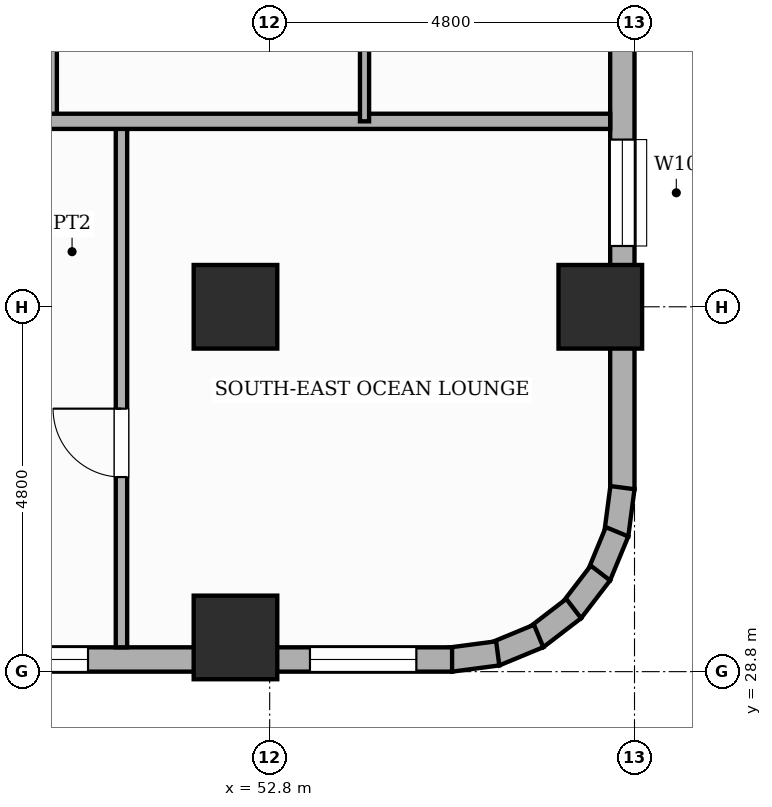
"""IFC4 building model, lengths in metres.
Left out: names, types, materials, properties, quantities, classifications, styles, units other than length and angle.
Written with IfcOpenShell. Run it as: python <this file> out.ifc"""

import sys

from ifc_helpers import new_model, si_unit, direction, frame, frame_2d, origin, origin_2d, place, context, subcontext, project, spatial, rectangle, extrude, element, fill, save


model = new_model("IFC4")
c1 = context("Model", 3, precision=1e-05, world=origin(), true_north=direction((0.0, 1.0)))
c2 = subcontext(c1, "Body", "Model", "MODEL_VIEW")
j1 = project(units=[si_unit("LENGTHUNIT", "METRE"), si_unit("PLANEANGLEUNIT", "RADIAN")], contexts=[c1])
p1 = place(None, origin())
s1 = spatial("IfcSite", under=j1, at=p1, CompositionType="ELEMENT")
p2 = place(p1, origin())
s2 = spatial("IfcBuilding", under=s1, at=p2, CompositionType="ELEMENT")
p3 = place(p2, frame((0.0, 0.0, 68.2)))
s3 = spatial("IfcBuildingStorey", under=s2, at=p3, CompositionType="ELEMENT", Elevation=68.2)
for number, where, z_axis, x_axis in (
    (1, (52.35, 29.25, 0.0), (0.0, 0.0, 1.0), (1.0, 0.0, 0.0)),
    (2, (52.35, 33.6, 0.0), (0.0, 0.0, 1.0), (1.0, 0.0, 0.0)),
    (3, (57.15, 33.6, 0.0), (0.0, 0.0, 1.0), (1.0, 0.0, 0.0)),
):
    element("IfcColumn", number, at=place(p3, frame(where, z_axis=z_axis, x_axis=x_axis)), inside=s3, PredefinedType="COLUMN", context=c2, shape_type="SweptSolid", body=[
        extrude(rectangle(XDim=1.1, YDim=1.1, at=origin_2d()), origin(), (0.0, 0.0, 1.0), 3.6),
    ])
p4 = place(p3, frame((57.44, 45.6, 0.0), z_axis=(0.0, 0.0, 1.0), x_axis=(0.0, -1.0, 0.0)))
e4 = element("IfcWall", 4, at=p4, inside=s3, PredefinedType="STANDARD", context=c2, shape_type="SweptSolid", body=[
    extrude(rectangle(XDim=14.4, YDim=0.32, at=frame_2d((7.2, 0.0))), origin(), (0.0, 0.0, 1.0), 2.53),
])
p5 = place(p4, frame((3.75, 0.0, 0.0)))
e5 = element("IfcOpeningElement", 5, at=p5, cuts=e4, PredefinedType="OPENING", context=c2, shape_type="SweptSolid", body=[
    extrude(rectangle(XDim=1.1, YDim=2.15, at=frame_2d((0.55, 1.075))), frame((0.0, 0.17, 0.0), z_axis=(0.0, -1.0, 0.0), x_axis=(1.0, 0.0, 0.0)), (0.0, 0.0, 1.0), 0.34),
])
p6 = place(p4, frame((5.428, 0.0, 0.45)))
e6 = element("IfcOpeningElement", 6, at=p6, cuts=e4, PredefinedType="OPENING", context=c2, shape_type="SweptSolid", body=[
    extrude(rectangle(XDim=0.95, YDim=1.8, at=frame_2d((0.475, 0.9))), frame((0.0, 0.17, 0.0), z_axis=(0.0, -1.0, 0.0), x_axis=(1.0, 0.0, 0.0)), (0.0, 0.0, 1.0), 0.34),
])
p7 = place(p4, frame((9.8, 0.0, 0.65)))
e7 = element("IfcOpeningElement", 7, at=p7, cuts=e4, PredefinedType="OPENING", context=c2, shape_type="SweptSolid", body=[
    extrude(rectangle(XDim=1.4, YDim=1.1, at=frame_2d((0.7, 0.55))), frame((0.0, 0.17, 0.0), z_axis=(0.0, -1.0, 0.0), x_axis=(1.0, 0.0, 0.0)), (0.0, 0.0, 1.0), 0.34),
])
p8 = place(p4, frame((0.771, 0.0, 0.45)))
e8 = element("IfcOpeningElement", 8, at=p8, cuts=e4, PredefinedType="OPENING", context=c2, shape_type="SweptSolid", body=[
    extrude(rectangle(XDim=0.75, YDim=1.8, at=frame_2d((0.375, 0.9))), frame((0.0, 0.17, 0.0), z_axis=(0.0, -1.0, 0.0), x_axis=(1.0, 0.0, 0.0)), (0.0, 0.0, 1.0), 0.34),
])
p9 = place(p3, frame((57.441, 31.221, 0.0), z_axis=(0.0, 0.0, 1.0), x_axis=(-0.130504898859, -0.991447664465, 0.0)))
e9 = element("IfcWall", 9, at=p9, inside=s3, PredefinedType="STANDARD", context=c2, shape_type="SweptSolid", body=[
    extrude(rectangle(XDim=0.627, YDim=0.32, at=frame_2d((0.313, 0.0))), origin(), (0.0, 0.0, 1.0), 3.35),
])
p10 = place(p3, frame((57.37, 30.64, 0.0), z_axis=(0.0, 0.0, 1.0), x_axis=(-0.382787856107, -0.923836271867, 0.0)))
e10 = element("IfcWall", 10, at=p10, inside=s3, PredefinedType="STANDARD", context=c2, shape_type="SweptSolid", body=[
    extrude(rectangle(XDim=0.626, YDim=0.32, at=frame_2d((0.313, 0.0))), origin(), (0.0, 0.0, 1.0), 3.35),
])
p11 = place(p3, frame((57.152, 30.097, 0.0), z_axis=(0.0, 0.0, 1.0), x_axis=(-0.608693302629, -0.793405610854, 0.0)))
e11 = element("IfcWall", 11, at=p11, inside=s3, PredefinedType="STANDARD", context=c2, shape_type="SweptSolid", body=[
    extrude(rectangle(XDim=0.626, YDim=0.32, at=frame_2d((0.313, 0.0))), origin(), (0.0, 0.0, 1.0), 3.35),
])
p12 = place(p3, frame((56.8, 29.63, 0.0), z_axis=(0.0, 0.0, 1.0), x_axis=(-0.793361818833, -0.608750379399, 0.0)))
e12 = element("IfcWall", 12, at=p12, inside=s3, PredefinedType="STANDARD", context=c2, shape_type="SweptSolid", body=[
    extrude(rectangle(XDim=0.627, YDim=0.32, at=frame_2d((0.313, 0.0))), origin(), (0.0, 0.0, 1.0), 3.35),
])
for number, where, z_axis, x_axis in (
    (13, (56.339, 29.269, 0.0), (0.0, 0.0, 1.0), (-0.924, -0.383, 0.0)),
    (14, (55.8, 29.04, 0.0), (0.0, 0.0, 1.0), (-0.991, -0.131, 0.0)),
):
    element("IfcWall", number, at=place(p3, frame(where, z_axis=z_axis, x_axis=x_axis)), inside=s3, PredefinedType="STANDARD", context=c2, shape_type="SweptSolid", body=[
        extrude(rectangle(XDim=0.626, YDim=0.32, at=frame_2d((0.313, 0.0))), origin(), (0.0, 0.0, 1.0), 3.35),
    ])
p13 = place(p3, frame((55.2, 28.96, 0.0), z_axis=(0.0, 0.0, 1.0), x_axis=(-1.0, 0.0, 0.0)))
e15 = element("IfcWall", 15, at=p13, inside=s3, PredefinedType="STANDARD", context=c2, shape_type="SweptSolid", body=[
    extrude(rectangle(XDim=28.8, YDim=0.32, at=frame_2d((14.4, 0.0))), origin(), (0.0, 0.0, 1.0), 2.53),
])
p14 = place(p13, frame((23.3, 0.0, 0.65)))
e16 = element("IfcOpeningElement", 16, at=p14, cuts=e15, PredefinedType="OPENING", context=c2, shape_type="SweptSolid", body=[
    extrude(rectangle(XDim=1.4, YDim=1.1, at=frame_2d((0.7, 0.55))), frame((0.0, 0.17, 0.0), z_axis=(0.0, -1.0, 0.0), x_axis=(1.0, 0.0, 0.0)), (0.0, 0.0, 1.0), 0.34),
])
p15 = place(p13, frame((13.0, 0.0, 0.65)))
e17 = element("IfcOpeningElement", 17, at=p15, cuts=e15, PredefinedType="OPENING", context=c2, shape_type="SweptSolid", body=[
    extrude(rectangle(XDim=1.4, YDim=1.1, at=frame_2d((0.7, 0.55))), frame((0.0, 0.17, 0.0), z_axis=(0.0, -1.0, 0.0), x_axis=(1.0, 0.0, 0.0)), (0.0, 0.0, 1.0), 0.34),
])
p16 = place(p13, frame((4.79, 0.0, 0.65)))
e18 = element("IfcOpeningElement", 18, at=p16, cuts=e15, PredefinedType="OPENING", context=c2, shape_type="SweptSolid", body=[
    extrude(rectangle(XDim=1.4, YDim=1.1, at=frame_2d((0.7, 0.55))), frame((0.0, 0.17, 0.0), z_axis=(0.0, -1.0, 0.0), x_axis=(1.0, 0.0, 0.0)), (0.0, 0.0, 1.0), 0.34),
])
p17 = place(p13, frame((0.47, 0.0, 0.65)))
e19 = element("IfcOpeningElement", 19, at=p17, cuts=e15, PredefinedType="OPENING", context=c2, shape_type="SweptSolid", body=[
    extrude(rectangle(XDim=1.4, YDim=1.1, at=frame_2d((0.7, 0.55))), frame((0.0, 0.17, 0.0), z_axis=(0.0, -1.0, 0.0), x_axis=(1.0, 0.0, 0.0)), (0.0, 0.0, 1.0), 0.34),
])
p18 = place(p13, frame((15.055, 0.0, 0.45)))
e20 = element("IfcOpeningElement", 20, at=p18, cuts=e15, PredefinedType="OPENING", context=c2, shape_type="SweptSolid", body=[
    extrude(rectangle(XDim=0.95, YDim=1.8, at=frame_2d((0.475, 0.9))), frame((0.0, 0.17, 0.0), z_axis=(0.0, -1.0, 0.0), x_axis=(1.0, 0.0, 0.0)), (0.0, 0.0, 1.0), 0.34),
])
p19 = place(p3, frame((49.9, 36.04, 0.0), z_axis=(0.0, 0.0, 1.0), x_axis=(0.0, 1.0, 0.0)))
e21 = element("IfcWall", 21, at=p19, inside=s3, PredefinedType="PARTITIONING", context=c2, shape_type="SweptSolid", body=[
    extrude(rectangle(XDim=11.64, YDim=0.2, at=frame_2d((5.82, 0.0))), origin(), (0.0, 0.0, 1.0), 3.35),
])
p20 = place(p19, frame((6.251, 0.0, 0.0)))
e22 = element("IfcOpeningElement", 22, at=p20, cuts=e21, PredefinedType="OPENING", context=c2, shape_type="SweptSolid", body=[
    extrude(rectangle(XDim=0.98, YDim=2.18, at=frame_2d((0.49, 1.09))), frame((0.0, 0.11, 0.0), z_axis=(0.0, -1.0, 0.0), x_axis=(1.0, 0.0, 0.0)), (0.0, 0.0, 1.0), 0.22),
])
p21 = place(p3, frame((50.85, 29.12, 0.0), z_axis=(0.0, 0.0, 1.0), x_axis=(0.0, 1.0, 0.0)))
e23 = element("IfcWall", 23, at=p21, inside=s3, PredefinedType="PARTITIONING", context=c2, shape_type="SweptSolid", body=[
    extrude(rectangle(XDim=6.92, YDim=0.15, at=frame_2d((3.46, 0.0))), origin(), (0.0, 0.0, 1.0), 3.35),
])
p22 = place(p21, frame((2.24, 0.0, 0.0)))
e24 = element("IfcOpeningElement", 24, at=p22, cuts=e23, PredefinedType="OPENING", context=c2, shape_type="SweptSolid", body=[
    extrude(rectangle(XDim=0.9, YDim=2.15, at=frame_2d((0.45, 1.075))), frame((0.0, 0.085, 0.0), z_axis=(0.0, -1.0, 0.0), x_axis=(1.0, 0.0, 0.0)), (0.0, 0.0, 1.0), 0.17),
])
p23 = place(p3, frame((49.9, 36.04, 0.0), z_axis=(0.0, 0.0, 1.0), x_axis=(1.0, 0.0, 0.0)))
e25 = element("IfcWall", 25, at=p23, inside=s3, PredefinedType="SOLIDWALL", context=c2, shape_type="SweptSolid", body=[
    extrude(rectangle(XDim=7.38, YDim=0.2, at=frame_2d((3.69, 0.0))), origin(), (0.0, 0.0, 1.0), 3.35),
])
p24 = place(p3, frame((54.048, 36.04, 0.0), z_axis=(0.0, 0.0, 1.0), x_axis=(0.0, 1.0, 0.0)))
e26 = element("IfcWall", 26, at=p24, inside=s3, PredefinedType="PARTITIONING", context=c2, shape_type="SweptSolid", body=[
    extrude(rectangle(XDim=4.384, YDim=0.12, at=frame_2d((2.192, 0.0))), origin(), (0.0, 0.0, 1.0), 3.35),
])
p25 = place(p7, origin())
e27 = element("IfcWindow", 27, at=p25, inside=s3, PartitioningType="SINGLE_PANEL", PredefinedType="WINDOW", context=c2, shape_type="SweptSolid", body=[
    extrude(rectangle(XDim=1.4, YDim=1.1, at=frame_2d((0.7, 0.55))), frame((0.0, 0.03, 0.0), z_axis=(0.0, -1.0, 0.0), x_axis=(1.0, 0.0, 0.0)), (0.0, 0.0, 1.0), 0.06),
])
fill(e7, e27)
p26 = place(p16, origin())
e28 = element("IfcWindow", 28, at=p26, inside=s3, PartitioningType="SINGLE_PANEL", PredefinedType="WINDOW", context=c2, shape_type="SweptSolid", body=[
    extrude(rectangle(XDim=1.4, YDim=1.1, at=frame_2d((0.7, 0.55))), frame((0.0, 0.03, 0.0), z_axis=(0.0, -1.0, 0.0), x_axis=(1.0, 0.0, 0.0)), (0.0, 0.0, 1.0), 0.06),
])
fill(e18, e28)
p27 = place(p17, origin())
e29 = element("IfcWindow", 29, at=p27, inside=s3, PartitioningType="SINGLE_PANEL", PredefinedType="WINDOW", context=c2, shape_type="SweptSolid", body=[
    extrude(rectangle(XDim=1.4, YDim=1.1, at=frame_2d((0.7, 0.55))), frame((0.0, 0.03, 0.0), z_axis=(0.0, -1.0, 0.0), x_axis=(1.0, 0.0, 0.0)), (0.0, 0.0, 1.0), 0.06),
])
fill(e19, e29)
p28 = place(p22, origin())
e30 = element("IfcDoor", 30, at=p28, inside=s3, OperationType="SINGLE_SWING_RIGHT", PredefinedType="DOOR", context=c2, shape_type="SweptSolid", body=[
    extrude(rectangle(XDim=0.9, YDim=2.15, at=frame_2d((0.45, 1.075))), frame((0.0, 0.025, 0.0), z_axis=(0.0, -1.0, 0.0), x_axis=(1.0, 0.0, 0.0)), (0.0, 0.0, 1.0), 0.05),
])
fill(e24, e30)
save(model, sys.argv[1])
